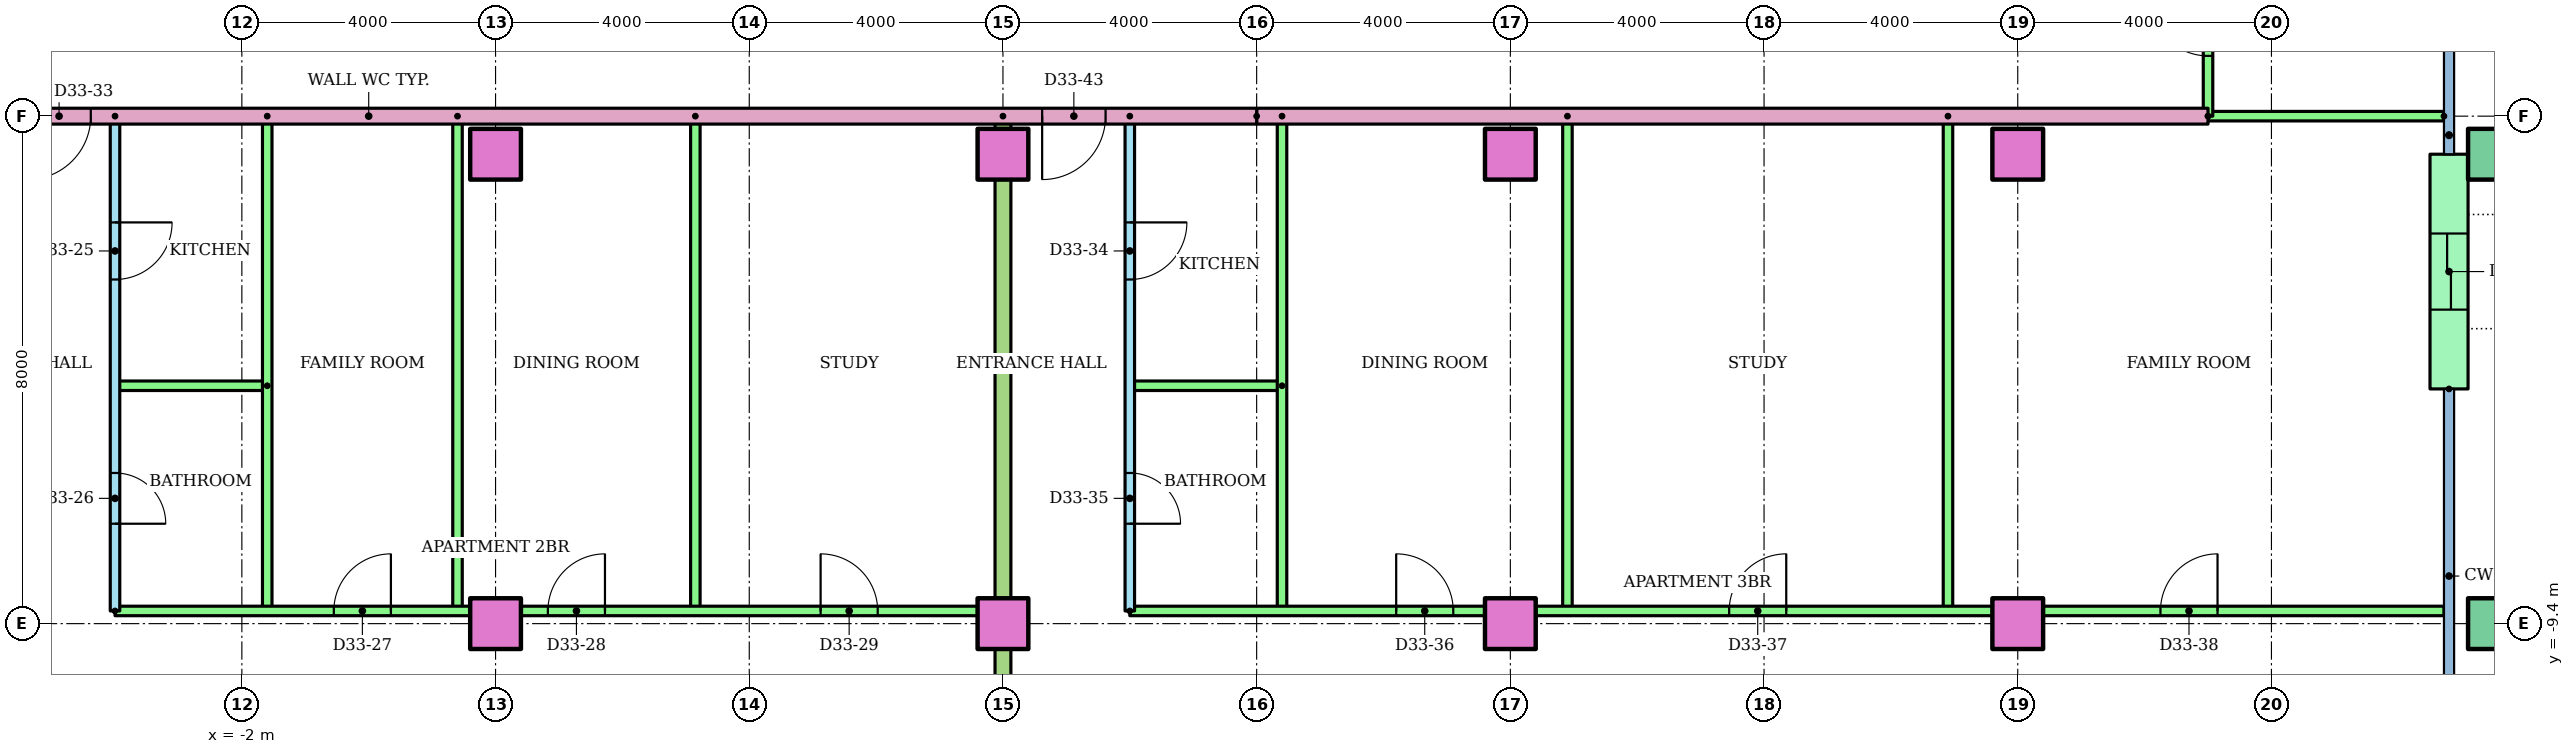
"""IFC4 building model, lengths in metres.
Left out: names, types, materials, properties, quantities, classifications, styles, units other than length and angle.
Written with IfcOpenShell. Run it as: python <this file> out.ifc"""

import sys

from ifc_helpers import new_model, si_unit, direction, frame, frame_2d, origin, origin_2d, place, context, subcontext, project, spatial, rectangle, hollow_rectangle, extrude, element, fill, save


model = new_model("IFC4")
c1 = context("Model", 3, precision=1e-05, world=origin(), true_north=direction((0.0, 1.0)))
c2 = subcontext(c1, "Body", "Model", "MODEL_VIEW")
j1 = project(units=[si_unit("LENGTHUNIT", "METRE"), si_unit("PLANEANGLEUNIT", "RADIAN")], contexts=[c1])
p1 = place(None, origin())
s1 = spatial("IfcSite", under=j1, at=p1, CompositionType="ELEMENT")
p2 = place(p1, origin())
s2 = spatial("IfcBuilding", under=s1, at=p2, CompositionType="ELEMENT")
p3 = place(p2, frame((0.0, 0.0, 129.4)))
s3 = spatial("IfcBuildingStorey", under=s2, at=p3, CompositionType="ELEMENT", Elevation=129.4)
for number, where in (
    (1, (2.0, -9.4, 0.0)),
    (2, (10.0, -9.4, 0.0)),
    (3, (18.0, -9.4, 0.0)),
    (4, (26.0, -9.4, 0.0)),
):
    element("IfcColumn", number, at=place(p3, frame(where)), inside=s3, PredefinedType="COLUMN", context=c2, shape_type="SweptSolid", body=[
        extrude(rectangle(XDim=0.8, YDim=0.8, at=origin_2d()), origin(), (0.0, 0.0, 1.0), 3.2),
    ])
p4 = place(p3, frame((33.5, -9.4, 0.0)))
e5 = element("IfcColumn", 5, at=p4, inside=s3, PredefinedType="COLUMN", context=c2, shape_type="SweptSolid", body=[
    extrude(hollow_rectangle(XDim=0.8, YDim=0.8, WallThickness=0.04, at=origin_2d()), origin(), (0.0, 0.0, 1.0), 3.2),
])
for number, where in (
    (6, (2.0, -2.0, 0.0)),
    (7, (10.0, -2.0, 0.0)),
    (8, (18.0, -2.0, 0.0)),
    (9, (26.0, -2.0, 0.0)),
):
    element("IfcColumn", number, at=place(p3, frame(where)), inside=s3, PredefinedType="COLUMN", context=c2, shape_type="SweptSolid", body=[
        extrude(rectangle(XDim=0.8, YDim=0.8, at=origin_2d()), origin(), (0.0, 0.0, 1.0), 3.2),
    ])
p5 = place(p3, frame((33.5, -2.0, 0.0)))
e10 = element("IfcColumn", 10, at=p5, inside=s3, PredefinedType="COLUMN", context=c2, shape_type="SweptSolid", body=[
    extrude(hollow_rectangle(XDim=0.8, YDim=0.8, WallThickness=0.04, at=origin_2d()), origin(), (0.0, 0.0, 1.0), 3.2),
])
p6 = place(p3, frame((32.8, -5.7, 0.0), z_axis=(0.0, 0.0, 1.0), x_axis=(0.0, 1.0, 0.0)))
e11 = element("IfcWall", 11, at=p6, inside=s3, PredefinedType="STANDARD", context=c2, shape_type="SweptSolid", body=[
    extrude(rectangle(XDim=3.7, YDim=0.6, at=frame_2d((1.85, 0.0))), origin(), (0.0, 0.0, 1.0), 2.92),
])
p7 = place(p6, frame((1.25, 0.0, 0.0)))
e12 = element("IfcOpeningElement", 12, at=p7, cuts=e11, PredefinedType="OPENING", context=c2, shape_type="SweptSolid", body=[
    extrude(rectangle(XDim=1.2, YDim=2.1, at=frame_2d((0.6, 1.05))), frame((0.0, 0.31, 0.0), z_axis=(0.0, -1.0, 0.0), x_axis=(1.0, 0.0, 0.0)), (0.0, 0.0, 1.0), 0.62),
])
p8 = place(p3, frame((-4.0, -1.4, 0.0), z_axis=(0.0, 0.0, 1.0), x_axis=(0.0, -1.0, 0.0)))
e13 = element("IfcWall", 13, at=p8, inside=s3, PredefinedType="PARTITIONING", context=c2, shape_type="SweptSolid", body=[
    extrude(rectangle(XDim=7.8, YDim=0.15, at=frame_2d((3.9, 0.0))), origin(), (0.0, 0.0, 1.0), 2.4),
])
p9 = place(p8, frame((1.675, 0.0, 0.0)))
e14 = element("IfcOpeningElement", 14, at=p9, cuts=e13, PredefinedType="OPENING", context=c2, shape_type="SweptSolid", body=[
    extrude(rectangle(XDim=0.9, YDim=2.1, at=frame_2d((0.45, 1.05))), frame((0.0, 0.085, 0.0), z_axis=(0.0, -1.0, 0.0), x_axis=(1.0, 0.0, 0.0)), (0.0, 0.0, 1.0), 0.17),
])
p10 = place(p8, frame((5.625, 0.0, 0.0)))
e15 = element("IfcOpeningElement", 15, at=p10, cuts=e13, PredefinedType="OPENING", context=c2, shape_type="SweptSolid", body=[
    extrude(rectangle(XDim=0.8, YDim=2.1, at=frame_2d((0.4, 1.05))), frame((0.0, 0.085, 0.0), z_axis=(0.0, -1.0, 0.0), x_axis=(1.0, 0.0, 0.0)), (0.0, 0.0, 1.0), 0.17),
])
p11 = place(p3, frame((-1.6, -5.65, 0.0), z_axis=(0.0, 0.0, 1.0), x_axis=(-1.0, 0.0, 0.0)))
e16 = element("IfcWall", 16, at=p11, inside=s3, PredefinedType="PARTITIONING", context=c2, shape_type="SweptSolid", body=[
    extrude(rectangle(XDim=2.4, YDim=0.15, at=frame_2d((1.2, 0.0))), origin(), (0.0, 0.0, 1.0), 2.4),
])
for number, where, z_axis, x_axis in (
    (17, (-1.6, -1.4, 0.0), (0.0, 0.0, 1.0), (0.0, -1.0, 0.0)),
    (18, (1.4, -1.4, 0.0), (0.0, 0.0, 1.0), (0.0, -1.0, 0.0)),
    (19, (5.15, -1.4, 0.0), (0.0, 0.0, 1.0), (0.0, -1.0, 0.0)),
):
    element("IfcWall", number, at=place(p3, frame(where, z_axis=z_axis, x_axis=x_axis)), inside=s3, PredefinedType="PARTITIONING", context=c2, shape_type="SweptSolid", body=[
        extrude(rectangle(XDim=7.8, YDim=0.15, at=frame_2d((3.9, 0.0))), origin(), (0.0, 0.0, 1.0), 2.4),
    ])
p12 = place(p3, frame((-4.0, -9.2, 0.0)))
e20 = element("IfcWall", 20, at=p12, inside=s3, PredefinedType="PARTITIONING", context=c2, shape_type="SweptSolid", body=[
    extrude(rectangle(XDim=14.0, YDim=0.15, at=frame_2d((7.0, 0.0))), origin(), (0.0, 0.0, 1.0), 2.4),
])
p13 = place(p12, frame((3.45, 0.0, 0.0)))
e21 = element("IfcOpeningElement", 21, at=p13, cuts=e20, PredefinedType="OPENING", context=c2, shape_type="SweptSolid", body=[
    extrude(rectangle(XDim=0.9, YDim=2.1, at=frame_2d((0.45, 1.05))), frame((0.0, 0.085, 0.0), z_axis=(0.0, -1.0, 0.0), x_axis=(1.0, 0.0, 0.0)), (0.0, 0.0, 1.0), 0.17),
])
p14 = place(p12, frame((6.825, 0.0, 0.0)))
e22 = element("IfcOpeningElement", 22, at=p14, cuts=e20, PredefinedType="OPENING", context=c2, shape_type="SweptSolid", body=[
    extrude(rectangle(XDim=0.9, YDim=2.1, at=frame_2d((0.45, 1.05))), frame((0.0, 0.085, 0.0), z_axis=(0.0, -1.0, 0.0), x_axis=(1.0, 0.0, 0.0)), (0.0, 0.0, 1.0), 0.17),
])
p15 = place(p12, frame((11.125, 0.0, 0.0)))
e23 = element("IfcOpeningElement", 23, at=p15, cuts=e20, PredefinedType="OPENING", context=c2, shape_type="SweptSolid", body=[
    extrude(rectangle(XDim=0.9, YDim=2.1, at=frame_2d((0.45, 1.05))), frame((0.0, 0.085, 0.0), z_axis=(0.0, -1.0, 0.0), x_axis=(1.0, 0.0, 0.0)), (0.0, 0.0, 1.0), 0.17),
])
p16 = place(p3, frame((12.0, -1.4, 0.0), z_axis=(0.0, 0.0, 1.0), x_axis=(0.0, -1.0, 0.0)))
e24 = element("IfcWall", 24, at=p16, inside=s3, PredefinedType="PARTITIONING", context=c2, shape_type="SweptSolid", body=[
    extrude(rectangle(XDim=7.8, YDim=0.15, at=frame_2d((3.9, 0.0))), origin(), (0.0, 0.0, 1.0), 2.4),
])
p17 = place(p16, frame((1.675, 0.0, 0.0)))
e25 = element("IfcOpeningElement", 25, at=p17, cuts=e24, PredefinedType="OPENING", context=c2, shape_type="SweptSolid", body=[
    extrude(rectangle(XDim=0.9, YDim=2.1, at=frame_2d((0.45, 1.05))), frame((0.0, 0.085, 0.0), z_axis=(0.0, -1.0, 0.0), x_axis=(1.0, 0.0, 0.0)), (0.0, 0.0, 1.0), 0.17),
])
p18 = place(p16, frame((5.625, 0.0, 0.0)))
e26 = element("IfcOpeningElement", 26, at=p18, cuts=e24, PredefinedType="OPENING", context=c2, shape_type="SweptSolid", body=[
    extrude(rectangle(XDim=0.8, YDim=2.1, at=frame_2d((0.4, 1.05))), frame((0.0, 0.085, 0.0), z_axis=(0.0, -1.0, 0.0), x_axis=(1.0, 0.0, 0.0)), (0.0, 0.0, 1.0), 0.17),
])
p19 = place(p3, frame((14.4, -5.65, 0.0), z_axis=(0.0, 0.0, 1.0), x_axis=(-1.0, 0.0, 0.0)))
e27 = element("IfcWall", 27, at=p19, inside=s3, PredefinedType="PARTITIONING", context=c2, shape_type="SweptSolid", body=[
    extrude(rectangle(XDim=2.4, YDim=0.15, at=frame_2d((1.2, 0.0))), origin(), (0.0, 0.0, 1.0), 2.4),
])
for number, where, z_axis, x_axis in (
    (28, (14.4, -1.4, 0.0), (0.0, 0.0, 1.0), (0.0, -1.0, 0.0)),
    (29, (18.9, -1.4, 0.0), (0.0, 0.0, 1.0), (0.0, -1.0, 0.0)),
    (30, (24.9, -1.4, 0.0), (0.0, 0.0, 1.0), (0.0, -1.0, 0.0)),
):
    element("IfcWall", number, at=place(p3, frame(where, z_axis=z_axis, x_axis=x_axis)), inside=s3, PredefinedType="PARTITIONING", context=c2, shape_type="SweptSolid", body=[
        extrude(rectangle(XDim=7.8, YDim=0.15, at=frame_2d((3.9, 0.0))), origin(), (0.0, 0.0, 1.0), 2.4),
    ])
p20 = place(p3, frame((12.0, -9.2, 0.0)))
e31 = element("IfcWall", 31, at=p20, inside=s3, PredefinedType="PARTITIONING", context=c2, shape_type="SweptSolid", body=[
    extrude(rectangle(XDim=20.72, YDim=0.15, at=frame_2d((10.36, 0.0))), origin(), (0.0, 0.0, 1.0), 2.4),
])
p21 = place(p20, frame((4.2, 0.0, 0.0)))
e32 = element("IfcOpeningElement", 32, at=p21, cuts=e31, PredefinedType="OPENING", context=c2, shape_type="SweptSolid", body=[
    extrude(rectangle(XDim=0.9, YDim=2.1, at=frame_2d((0.45, 1.05))), frame((0.0, 0.085, 0.0), z_axis=(0.0, -1.0, 0.0), x_axis=(1.0, 0.0, 0.0)), (0.0, 0.0, 1.0), 0.17),
])
p22 = place(p20, frame((9.45, 0.0, 0.0)))
e33 = element("IfcOpeningElement", 33, at=p22, cuts=e31, PredefinedType="OPENING", context=c2, shape_type="SweptSolid", body=[
    extrude(rectangle(XDim=0.9, YDim=2.1, at=frame_2d((0.45, 1.05))), frame((0.0, 0.085, 0.0), z_axis=(0.0, -1.0, 0.0), x_axis=(1.0, 0.0, 0.0)), (0.0, 0.0, 1.0), 0.17),
])
p23 = place(p20, frame((16.25, 0.0, 0.0)))
e34 = element("IfcOpeningElement", 34, at=p23, cuts=e31, PredefinedType="OPENING", context=c2, shape_type="SweptSolid", body=[
    extrude(rectangle(XDim=0.9, YDim=2.1, at=frame_2d((0.45, 1.05))), frame((0.0, 0.085, 0.0), z_axis=(0.0, -1.0, 0.0), x_axis=(1.0, 0.0, 0.0)), (0.0, 0.0, 1.0), 0.17),
])
p24 = place(p3, frame((10.0, -1.4, 0.0), z_axis=(0.0, 0.0, 1.0), x_axis=(0.0, -1.0, 0.0)))
e35 = element("IfcWall", 35, at=p24, inside=s3, PredefinedType="PARTITIONING", context=c2, shape_type="SweptSolid", body=[
    extrude(rectangle(XDim=14.91, YDim=0.25, at=frame_2d((7.455, 0.0))), origin(), (0.0, 0.0, 1.0), 2.4),
])
p25 = place(p3, frame((29.0, -1.4, 0.0), z_axis=(0.0, 0.0, 1.0), x_axis=(-1.0, 0.0, 0.0)))
e36 = element("IfcWall", 36, at=p25, inside=s3, PredefinedType="PARTITIONING", context=c2, shape_type="SweptSolid", body=[
    extrude(rectangle(XDim=15.0, YDim=0.25, at=frame_2d((7.5, 0.0))), origin(), (0.0, 0.0, 1.0), 2.4),
])
p26 = place(p3, frame((32.72, -1.4, 0.0), z_axis=(0.0, 0.0, 1.0), x_axis=(-1.0, 0.0, 0.0)))
e37 = element("IfcWall", 37, at=p26, inside=s3, PredefinedType="PARTITIONING", context=c2, shape_type="SweptSolid", body=[
    extrude(rectangle(XDim=3.72, YDim=0.15, at=frame_2d((1.86, 0.0))), origin(), (0.0, 0.0, 1.0), 2.4),
])
p27 = place(p3, frame((29.0, -1.4, 0.0), z_axis=(0.0, 0.0, 1.0), x_axis=(0.0, 1.0, 0.0)))
e38 = element("IfcWall", 38, at=p27, inside=s3, PredefinedType="PARTITIONING", context=c2, shape_type="SweptSolid", body=[
    extrude(rectangle(XDim=2.8, YDim=0.15, at=frame_2d((1.4, 0.0))), origin(), (0.0, 0.0, 1.0), 2.4),
])
p28 = place(p27, frame((0.95, 0.0, 0.0)))
e39 = element("IfcOpeningElement", 39, at=p28, cuts=e38, PredefinedType="OPENING", context=c2, shape_type="SweptSolid", body=[
    extrude(rectangle(XDim=0.9, YDim=2.1, at=frame_2d((0.45, 1.05))), frame((0.0, 0.085, 0.0), z_axis=(0.0, -1.0, 0.0), x_axis=(1.0, 0.0, 0.0)), (0.0, 0.0, 1.0), 0.17),
])
p29 = place(p3, frame((14.0, -1.4, 0.0), z_axis=(0.0, 0.0, 1.0), x_axis=(-1.0, 0.0, 0.0)))
e40 = element("IfcWall", 40, at=p29, inside=s3, PredefinedType="PARTITIONING", context=c2, shape_type="SweptSolid", body=[
    extrude(rectangle(XDim=28.0, YDim=0.25, at=frame_2d((14.0, 0.0))), origin(), (0.0, 0.0, 1.0), 2.4),
])
p30 = place(p29, frame((20.618, 0.0, 0.0)))
e41 = element("IfcOpeningElement", 41, at=p30, cuts=e40, PredefinedType="OPENING", context=c2, shape_type="SweptSolid", body=[
    extrude(rectangle(XDim=1.0, YDim=2.1, at=frame_2d((0.5, 1.05))), frame((0.0, 0.135, 0.0), z_axis=(0.0, -1.0, 0.0), x_axis=(1.0, 0.0, 0.0)), (0.0, 0.0, 1.0), 0.27),
])
p31 = place(p29, frame((18.382, 0.0, 0.0)))
e42 = element("IfcOpeningElement", 42, at=p31, cuts=e40, PredefinedType="OPENING", context=c2, shape_type="SweptSolid", body=[
    extrude(rectangle(XDim=1.0, YDim=2.1, at=frame_2d((0.5, 1.05))), frame((0.0, 0.135, 0.0), z_axis=(0.0, -1.0, 0.0), x_axis=(1.0, 0.0, 0.0)), (0.0, 0.0, 1.0), 0.27),
])
p32 = place(p29, frame((2.382, 0.0, 0.0)))
e43 = element("IfcOpeningElement", 43, at=p32, cuts=e40, PredefinedType="OPENING", context=c2, shape_type="SweptSolid", body=[
    extrude(rectangle(XDim=1.0, YDim=2.1, at=frame_2d((0.5, 1.05))), frame((0.0, 0.135, 0.0), z_axis=(0.0, -1.0, 0.0), x_axis=(1.0, 0.0, 0.0)), (0.0, 0.0, 1.0), 0.27),
])
p33 = place(p9, origin())
e44 = element("IfcDoor", 44, at=p33, inside=s3, OperationType="SINGLE_SWING_LEFT", PredefinedType="DOOR", context=c2, shape_type="SweptSolid", body=[
    extrude(rectangle(XDim=0.9, YDim=2.1, at=frame_2d((0.45, 1.05))), frame((0.0, 0.025, 0.0), z_axis=(0.0, -1.0, 0.0), x_axis=(1.0, 0.0, 0.0)), (0.0, 0.0, 1.0), 0.05),
])
fill(e14, e44)
p34 = place(p10, origin())
e45 = element("IfcDoor", 45, at=p34, inside=s3, OperationType="SINGLE_SWING_RIGHT", PredefinedType="DOOR", context=c2, shape_type="SweptSolid", body=[
    extrude(rectangle(XDim=0.8, YDim=2.1, at=frame_2d((0.4, 1.05))), frame((0.0, 0.025, 0.0), z_axis=(0.0, -1.0, 0.0), x_axis=(1.0, 0.0, 0.0)), (0.0, 0.0, 1.0), 0.05),
])
fill(e15, e45)
p35 = place(p13, origin())
e46 = element("IfcDoor", 46, at=p35, inside=s3, OperationType="SINGLE_SWING_RIGHT", PredefinedType="DOOR", context=c2, shape_type="SweptSolid", body=[
    extrude(rectangle(XDim=0.9, YDim=2.1, at=frame_2d((0.45, 1.05))), frame((0.0, 0.025, 0.0), z_axis=(0.0, -1.0, 0.0), x_axis=(1.0, 0.0, 0.0)), (0.0, 0.0, 1.0), 0.05),
])
fill(e21, e46)
p36 = place(p14, origin())
e47 = element("IfcDoor", 47, at=p36, inside=s3, OperationType="SINGLE_SWING_RIGHT", PredefinedType="DOOR", context=c2, shape_type="SweptSolid", body=[
    extrude(rectangle(XDim=0.9, YDim=2.1, at=frame_2d((0.45, 1.05))), frame((0.0, 0.025, 0.0), z_axis=(0.0, -1.0, 0.0), x_axis=(1.0, 0.0, 0.0)), (0.0, 0.0, 1.0), 0.05),
])
fill(e22, e47)
p37 = place(p15, origin())
e48 = element("IfcDoor", 48, at=p37, inside=s3, OperationType="SINGLE_SWING_LEFT", PredefinedType="DOOR", context=c2, shape_type="SweptSolid", body=[
    extrude(rectangle(XDim=0.9, YDim=2.1, at=frame_2d((0.45, 1.05))), frame((0.0, 0.025, 0.0), z_axis=(0.0, -1.0, 0.0), x_axis=(1.0, 0.0, 0.0)), (0.0, 0.0, 1.0), 0.05),
])
fill(e23, e48)
p38 = place(p31, origin())
e49 = element("IfcDoor", 49, at=p38, inside=s3, OperationType="SINGLE_SWING_RIGHT", PredefinedType="DOOR", context=c2, shape_type="SweptSolid", body=[
    extrude(rectangle(XDim=1.0, YDim=2.1, at=frame_2d((0.5, 1.05))), frame((0.0, 0.025, 0.0), z_axis=(0.0, -1.0, 0.0), x_axis=(1.0, 0.0, 0.0)), (0.0, 0.0, 1.0), 0.05),
])
fill(e42, e49)
p39 = place(p17, origin())
e50 = element("IfcDoor", 50, at=p39, inside=s3, OperationType="SINGLE_SWING_LEFT", PredefinedType="DOOR", context=c2, shape_type="SweptSolid", body=[
    extrude(rectangle(XDim=0.9, YDim=2.1, at=frame_2d((0.45, 1.05))), frame((0.0, 0.025, 0.0), z_axis=(0.0, -1.0, 0.0), x_axis=(1.0, 0.0, 0.0)), (0.0, 0.0, 1.0), 0.05),
])
fill(e25, e50)
p40 = place(p18, origin())
e51 = element("IfcDoor", 51, at=p40, inside=s3, OperationType="SINGLE_SWING_RIGHT", PredefinedType="DOOR", context=c2, shape_type="SweptSolid", body=[
    extrude(rectangle(XDim=0.8, YDim=2.1, at=frame_2d((0.4, 1.05))), frame((0.0, 0.025, 0.0), z_axis=(0.0, -1.0, 0.0), x_axis=(1.0, 0.0, 0.0)), (0.0, 0.0, 1.0), 0.05),
])
fill(e26, e51)
p41 = place(p21, origin())
e52 = element("IfcDoor", 52, at=p41, inside=s3, OperationType="SINGLE_SWING_LEFT", PredefinedType="DOOR", context=c2, shape_type="SweptSolid", body=[
    extrude(rectangle(XDim=0.9, YDim=2.1, at=frame_2d((0.45, 1.05))), frame((0.0, 0.025, 0.0), z_axis=(0.0, -1.0, 0.0), x_axis=(1.0, 0.0, 0.0)), (0.0, 0.0, 1.0), 0.05),
])
fill(e32, e52)
p42 = place(p22, origin())
e53 = element("IfcDoor", 53, at=p42, inside=s3, OperationType="SINGLE_SWING_RIGHT", PredefinedType="DOOR", context=c2, shape_type="SweptSolid", body=[
    extrude(rectangle(XDim=0.9, YDim=2.1, at=frame_2d((0.45, 1.05))), frame((0.0, 0.025, 0.0), z_axis=(0.0, -1.0, 0.0), x_axis=(1.0, 0.0, 0.0)), (0.0, 0.0, 1.0), 0.05),
])
fill(e33, e53)
p43 = place(p23, origin())
e54 = element("IfcDoor", 54, at=p43, inside=s3, OperationType="SINGLE_SWING_RIGHT", PredefinedType="DOOR", context=c2, shape_type="SweptSolid", body=[
    extrude(rectangle(XDim=0.9, YDim=2.1, at=frame_2d((0.45, 1.05))), frame((0.0, 0.025, 0.0), z_axis=(0.0, -1.0, 0.0), x_axis=(1.0, 0.0, 0.0)), (0.0, 0.0, 1.0), 0.05),
])
fill(e34, e54)
p44 = place(p32, origin())
e55 = element("IfcDoor", 55, at=p44, inside=s3, OperationType="SINGLE_SWING_RIGHT", PredefinedType="DOOR", context=c2, shape_type="SweptSolid", body=[
    extrude(rectangle(XDim=1.0, YDim=2.1, at=frame_2d((0.5, 1.05))), frame((0.0, 0.025, 0.0), z_axis=(0.0, -1.0, 0.0), x_axis=(1.0, 0.0, 0.0)), (0.0, 0.0, 1.0), 0.05),
])
fill(e43, e55)
p45 = place(p28, origin())
e56 = element("IfcDoor", 56, at=p45, inside=s3, OperationType="SINGLE_SWING_RIGHT", PredefinedType="DOOR", context=c2, shape_type="SweptSolid", body=[
    extrude(rectangle(XDim=0.9, YDim=2.1, at=frame_2d((0.45, 1.05))), frame((0.0, 0.025, 0.0), z_axis=(0.0, -1.0, 0.0), x_axis=(1.0, 0.0, 0.0)), (0.0, 0.0, 1.0), 0.05),
])
fill(e39, e56)
p46 = place(p7, origin())
e57 = element("IfcDoor", 57, at=p46, inside=s3, OperationType="SLIDING_TO_LEFT", PredefinedType="DOOR", context=c2, shape_type="SweptSolid", body=[
    extrude(rectangle(XDim=1.2, YDim=2.1, at=frame_2d((0.6, 1.05))), frame((0.0, 0.025, 0.0), z_axis=(0.0, -1.0, 0.0), x_axis=(1.0, 0.0, 0.0)), (0.0, 0.0, 1.0), 0.05),
])
fill(e12, e57)
save(model, sys.argv[1])
